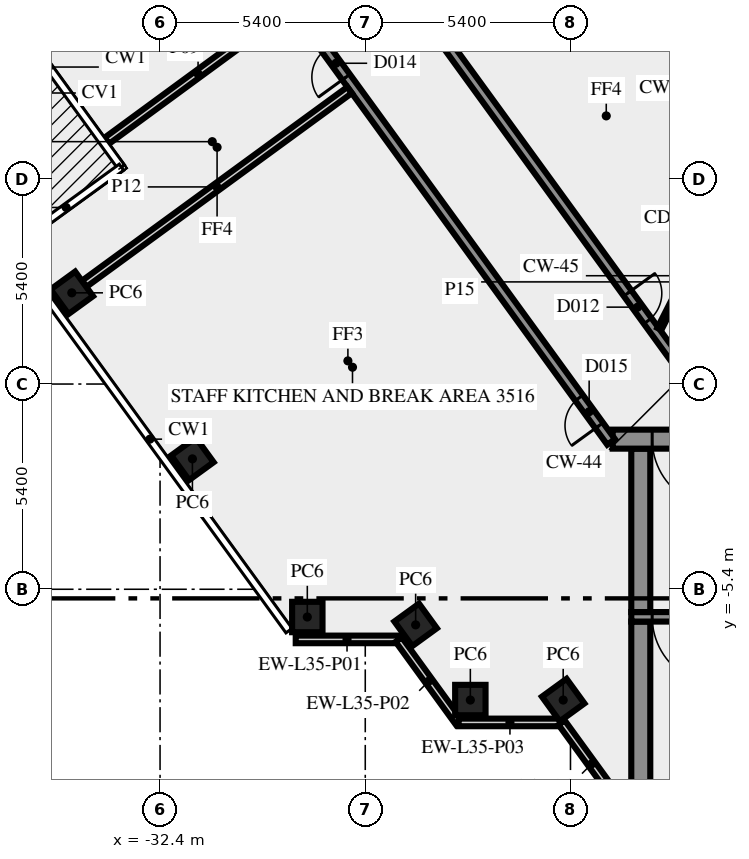
"""IFC4 building model, lengths in metres.
Left out: names, types, materials, properties, quantities, classifications, styles, units other than length and angle.
Written with IfcOpenShell. Run it as: python <this file> out.ifc"""

import sys

from ifc_helpers import new_model, si_unit, direction, frame, frame_2d, origin, origin_2d, place, context, subcontext, project, spatial, rectangle, extrude, element, fill, save


model = new_model("IFC4")
c1 = context("Model", 3, precision=1e-05, world=origin(), true_north=direction((0.0, 1.0)))
c2 = subcontext(c1, "Body", "Model", "MODEL_VIEW")
j1 = project(units=[si_unit("LENGTHUNIT", "METRE"), si_unit("PLANEANGLEUNIT", "RADIAN")], contexts=[c1])
p1 = place(None, origin())
s1 = spatial("IfcSite", under=j1, at=p1, CompositionType="ELEMENT")
p2 = place(p1, origin())
s2 = spatial("IfcBuilding", under=s1, at=p2, CompositionType="ELEMENT")
p3 = place(p2, frame((0.0, 0.0, 152.0)))
s3 = spatial("IfcBuildingStorey", under=s2, at=p3, CompositionType="ELEMENT", Elevation=152.0)
for number, where, z_axis, x_axis in (
    (1, (-34.722, 2.4, 0.0), (0.0, 0.0, 1.0), (0.588, -0.809, 0.0)),
    (2, (-31.548, -1.969, 0.0), (0.0, 0.0, 1.0), (0.588, -0.809, 0.0)),
    (3, (-28.525, -6.13, 0.0), (0.0, 0.0, 1.0), (1.0, 0.0, 0.0)),
    (4, (-25.674, -6.337, 0.0), (0.0, 0.0, 1.0), (0.588, -0.809, 0.0)),
    (5, (-24.235, -8.315, 0.0), (0.0, 0.0, 1.0), (1.0, 0.0, 0.0)),
    (6, (-21.792, -8.315, 0.0), (0.0, 0.0, 1.0), (0.588, -0.809, 0.0)),
):
    element("IfcColumn", number, at=place(p3, frame(where, z_axis=z_axis, x_axis=x_axis)), inside=s3, PredefinedType="COLUMN", context=c2, shape_type="SweptSolid", body=[
        extrude(rectangle(XDim=0.8, YDim=0.8, at=origin_2d()), origin(), (0.0, 0.0, 1.0), 3.65),
    ])
p4 = place(p3, frame((-28.83, -6.719, 0.0), z_axis=(0.0, 0.0, 1.0), x_axis=(1.0, 0.0, 0.0)))
e7 = element("IfcWall", 7, at=p4, inside=s3, PredefinedType="SOLIDWALL", context=c2, shape_type="SweptSolid", body=[
    extrude(rectangle(XDim=2.7, YDim=0.2, at=frame_2d((1.35, 0.0))), origin(), (0.0, 0.0, 1.0), 3.65),
])
p5 = place(p3, frame((-26.12, -6.724, 0.0), z_axis=(0.0, 0.0, 1.0), x_axis=(0.587720002413, -0.809064397168, 0.0)))
e8 = element("IfcWall", 8, at=p5, inside=s3, PredefinedType="SOLIDWALL", context=c2, shape_type="SweptSolid", body=[
    extrude(rectangle(XDim=2.7, YDim=0.2, at=frame_2d((1.35, 0.0))), origin(), (0.0, 0.0, 1.0), 3.65),
])
p6 = place(p3, frame((-24.543, -8.904, 0.0), z_axis=(0.0, 0.0, 1.0), x_axis=(1.0, 0.0, 0.0)))
e9 = element("IfcWall", 9, at=p6, inside=s3, PredefinedType="SOLIDWALL", context=c2, shape_type="SweptSolid", body=[
    extrude(rectangle(XDim=2.7, YDim=0.2, at=frame_2d((1.35, 0.0))), origin(), (0.0, 0.0, 1.0), 3.65),
])
p7 = place(p3, frame((-21.833, -8.909, 0.0), z_axis=(0.0, 0.0, 1.0), x_axis=(0.587766567315, -0.809030569476, 0.0)))
e10 = element("IfcWall", 10, at=p7, inside=s3, PredefinedType="SOLIDWALL", context=c2, shape_type="SweptSolid", body=[
    extrude(rectangle(XDim=2.688, YDim=0.2, at=frame_2d((1.344, 0.0))), origin(), (0.0, 0.0, 1.0), 3.65),
])
p8 = place(p3, frame((-19.75, -10.5, 0.0), z_axis=(0.0, 0.0, 1.0), x_axis=(0.0, 1.0, 0.0)))
e11 = element("IfcWall", 11, at=p8, inside=s3, PredefinedType="SHEAR", context=c2, shape_type="SweptSolid", body=[
    extrude(rectangle(XDim=4.25, YDim=0.5, at=frame_2d((2.125, 0.0))), origin(), (0.0, 0.0, 1.0), 3.65),
])
p9 = place(p3, frame((-9.8, -6.125, 0.0), z_axis=(0.0, 0.0, 1.0), x_axis=(-1.0, 0.0, 0.0)))
e12 = element("IfcWall", 12, at=p9, inside=s3, PredefinedType="SHEAR", context=c2, shape_type="SweptSolid", body=[
    extrude(rectangle(XDim=10.2, YDim=0.25, at=frame_2d((5.1, 0.0))), origin(), (0.0, 0.0, 1.0), 3.65),
])
p10 = place(p9, frame((7.85, 0.0, 0.0)))
e13 = element("IfcOpeningElement", 13, at=p10, cuts=e12, PredefinedType="OPENING", context=c2, shape_type="SweptSolid", body=[
    extrude(rectangle(XDim=1.8, YDim=2.1, at=frame_2d((0.9, 1.05))), frame((0.0, 0.135, 0.0), z_axis=(0.0, -1.0, 0.0), x_axis=(1.0, 0.0, 0.0)), (0.0, 0.0, 1.0), 0.27),
])
p11 = place(p3, frame((-19.75, -6.0, 0.0), z_axis=(0.0, 0.0, 1.0), x_axis=(0.0, 1.0, 0.0)))
e14 = element("IfcWall", 14, at=p11, inside=s3, PredefinedType="SHEAR", context=c2, shape_type="SweptSolid", body=[
    extrude(rectangle(XDim=4.3, YDim=0.5, at=frame_2d((2.15, 0.0))), origin(), (0.0, 0.0, 1.0), 3.65),
])
p12 = place(p3, frame((20.49, -1.45, 0.0), z_axis=(0.0, 0.0, 1.0), x_axis=(-1.0, 0.0, 0.0)))
e15 = element("IfcWall", 15, at=p12, inside=s3, PredefinedType="SHEAR", context=c2, shape_type="SweptSolid", body=[
    extrude(rectangle(XDim=40.98, YDim=0.5, at=frame_2d((20.49, 0.0))), origin(), (0.0, 0.0, 1.0), 3.65),
])
p13 = place(p12, frame((38.14, 0.0, 0.0)))
e16 = element("IfcOpeningElement", 16, at=p13, cuts=e15, PredefinedType="OPENING", context=c2, shape_type="SweptSolid", body=[
    extrude(rectangle(XDim=1.8, YDim=2.1, at=frame_2d((0.9, 1.05))), frame((0.0, 0.26, 0.0), z_axis=(0.0, -1.0, 0.0), x_axis=(1.0, 0.0, 0.0)), (0.0, 0.0, 1.0), 0.52),
])
p14 = place(p12, frame((35.89, 0.0, 0.0)))
e17 = element("IfcOpeningElement", 17, at=p14, cuts=e15, PredefinedType="OPENING", context=c2, shape_type="SweptSolid", body=[
    extrude(rectangle(XDim=0.9, YDim=2.1, at=frame_2d((0.45, 1.05))), frame((0.0, 0.26, 0.0), z_axis=(0.0, -1.0, 0.0), x_axis=(1.0, 0.0, 0.0)), (0.0, 0.0, 1.0), 0.52),
])
p15 = place(p12, frame((32.94, 0.0, 0.0)))
e18 = element("IfcOpeningElement", 18, at=p15, cuts=e15, PredefinedType="OPENING", context=c2, shape_type="SweptSolid", body=[
    extrude(rectangle(XDim=0.9, YDim=2.1, at=frame_2d((0.45, 1.05))), frame((0.0, 0.26, 0.0), z_axis=(0.0, -1.0, 0.0), x_axis=(1.0, 0.0, 0.0)), (0.0, 0.0, 1.0), 0.52),
])
p16 = place(p12, frame((29.802, 0.0, 0.0)))
e19 = element("IfcOpeningElement", 19, at=p16, cuts=e15, PredefinedType="OPENING", context=c2, shape_type="SweptSolid", body=[
    extrude(rectangle(XDim=0.9, YDim=2.1, at=frame_2d((0.45, 1.05))), frame((0.0, 0.26, 0.0), z_axis=(0.0, -1.0, 0.0), x_axis=(1.0, 0.0, 0.0)), (0.0, 0.0, 1.0), 0.52),
])
p17 = place(p12, frame((26.077, 0.0, 0.0)))
e20 = element("IfcOpeningElement", 20, at=p17, cuts=e15, PredefinedType="OPENING", context=c2, shape_type="SweptSolid", body=[
    extrude(rectangle(XDim=0.9, YDim=2.1, at=frame_2d((0.45, 1.05))), frame((0.0, 0.26, 0.0), z_axis=(0.0, -1.0, 0.0), x_axis=(1.0, 0.0, 0.0)), (0.0, 0.0, 1.0), 0.52),
])
p18 = place(p12, frame((19.59, 0.0, 0.0)))
e21 = element("IfcOpeningElement", 21, at=p18, cuts=e15, PredefinedType="OPENING", context=c2, shape_type="SweptSolid", body=[
    extrude(rectangle(XDim=2.0, YDim=2.1, at=frame_2d((1.0, 1.05))), frame((0.0, 0.26, 0.0), z_axis=(0.0, -1.0, 0.0), x_axis=(1.0, 0.0, 0.0)), (0.0, 0.0, 1.0), 0.52),
])
p19 = place(p12, frame((7.14, 0.0, 0.0)))
e22 = element("IfcOpeningElement", 22, at=p19, cuts=e15, PredefinedType="OPENING", context=c2, shape_type="SweptSolid", body=[
    extrude(rectangle(XDim=0.9, YDim=2.1, at=frame_2d((0.45, 1.05))), frame((0.0, 0.26, 0.0), z_axis=(0.0, -1.0, 0.0), x_axis=(1.0, 0.0, 0.0)), (0.0, 0.0, 1.0), 0.52),
])
p20 = place(p12, frame((5.028, 0.0, 0.0)))
e23 = element("IfcOpeningElement", 23, at=p20, cuts=e15, PredefinedType="OPENING", context=c2, shape_type="SweptSolid", body=[
    extrude(rectangle(XDim=0.8, YDim=2.1, at=frame_2d((0.4, 1.05))), frame((0.0, 0.26, 0.0), z_axis=(0.0, -1.0, 0.0), x_axis=(1.0, 0.0, 0.0)), (0.0, 0.0, 1.0), 0.52),
])
p21 = place(p12, frame((3.452, 0.0, 0.0)))
e24 = element("IfcOpeningElement", 24, at=p21, cuts=e15, PredefinedType="OPENING", context=c2, shape_type="SweptSolid", body=[
    extrude(rectangle(XDim=0.8, YDim=2.1, at=frame_2d((0.4, 1.05))), frame((0.0, 0.26, 0.0), z_axis=(0.0, -1.0, 0.0), x_axis=(1.0, 0.0, 0.0)), (0.0, 0.0, 1.0), 0.52),
])
p22 = place(p12, frame((1.04, 0.0, 0.0)))
e25 = element("IfcOpeningElement", 25, at=p22, cuts=e15, PredefinedType="OPENING", context=c2, shape_type="SweptSolid", body=[
    extrude(rectangle(XDim=1.8, YDim=2.1, at=frame_2d((0.9, 1.05))), frame((0.0, 0.26, 0.0), z_axis=(0.0, -1.0, 0.0), x_axis=(1.0, 0.0, 0.0)), (0.0, 0.0, 1.0), 0.52),
])
p23 = place(p3, frame((-20.531, -1.523, 0.0), z_axis=(0.0, 0.0, 1.0), x_axis=(-0.587785812891, 0.809016587076, 0.0)))
e26 = element("IfcWall", 26, at=p23, inside=s3, PredefinedType="SOLIDWALL", context=c2, shape_type="SweptSolid", body=[
    extrude(rectangle(XDim=28.67, YDim=0.25, at=frame_2d((14.335, 0.0))), origin(), (0.0, 0.0, 1.0), 3.65),
])
p24 = place(p23, frame((27.296, 0.0, 0.0)))
e27 = element("IfcOpeningElement", 27, at=p24, cuts=e26, PredefinedType="OPENING", context=c2, shape_type="SweptSolid", body=[
    extrude(rectangle(XDim=0.9, YDim=2.1, at=frame_2d((0.45, 1.05))), frame((0.0, 0.135, 0.0), z_axis=(0.0, -1.0, 0.0), x_axis=(1.0, 0.0, 0.0)), (0.0, 0.0, 1.0), 0.27),
])
p25 = place(p23, frame((11.866, 0.0, 0.0)))
e28 = element("IfcOpeningElement", 28, at=p25, cuts=e26, PredefinedType="OPENING", context=c2, shape_type="SweptSolid", body=[
    extrude(rectangle(XDim=0.9, YDim=2.1, at=frame_2d((0.45, 1.05))), frame((0.0, 0.135, 0.0), z_axis=(0.0, -1.0, 0.0), x_axis=(1.0, 0.0, 0.0)), (0.0, 0.0, 1.0), 0.27),
])
p26 = place(p23, frame((0.533, 0.0, 0.0)))
e29 = element("IfcOpeningElement", 29, at=p26, cuts=e26, PredefinedType="OPENING", context=c2, shape_type="SweptSolid", body=[
    extrude(rectangle(XDim=0.9, YDim=2.1, at=frame_2d((0.45, 1.05))), frame((0.0, 0.135, 0.0), z_axis=(0.0, -1.0, 0.0), x_axis=(1.0, 0.0, 0.0)), (0.0, 0.0, 1.0), 0.27),
])
p27 = place(p3, frame((-35.092, 23.027, 0.0), z_axis=(0.0, 0.0, 1.0), x_axis=(0.587784076945, -0.809017848313, 0.0)))
e30 = element("IfcWall", 30, at=p27, inside=s3, PredefinedType="SOLIDWALL", context=c2, shape_type="SweptSolid", body=[
    extrude(rectangle(XDim=29.853, YDim=0.25, at=frame_2d((14.927, 0.0))), origin(), (0.0, 0.0, 1.0), 3.65),
])
p28 = place(p27, frame((0.224, 0.0, 0.0)))
e31 = element("IfcOpeningElement", 31, at=p28, cuts=e30, PredefinedType="OPENING", context=c2, shape_type="SweptSolid", body=[
    extrude(rectangle(XDim=0.9, YDim=2.1, at=frame_2d((0.45, 1.05))), frame((0.0, 0.135, 0.0), z_axis=(0.0, -1.0, 0.0), x_axis=(1.0, 0.0, 0.0)), (0.0, 0.0, 1.0), 0.27),
])
p29 = place(p27, frame((25.512, 0.0, 0.0)))
e32 = element("IfcOpeningElement", 32, at=p29, cuts=e30, PredefinedType="OPENING", context=c2, shape_type="SweptSolid", body=[
    extrude(rectangle(XDim=0.9, YDim=2.1, at=frame_2d((0.45, 1.05))), frame((0.0, 0.135, 0.0), z_axis=(0.0, -1.0, 0.0), x_axis=(1.0, 0.0, 0.0)), (0.0, 0.0, 1.0), 0.27),
])
p30 = place(p3, frame((-33.799, 6.403, 0.0), z_axis=(0.0, 0.0, 1.0), x_axis=(0.806598014579, 0.591100366163, 0.0)))
e33 = element("IfcWall", 33, at=p30, inside=s3, PredefinedType="SOLIDWALL", context=c2, shape_type="SweptSolid", body=[
    extrude(rectangle(XDim=5.95, YDim=0.2, at=frame_2d((2.975, 0.0))), origin(), (0.0, 0.0, 1.0), 3.65),
])
p31 = place(p3, frame((-34.395, 2.638, 0.0), z_axis=(0.0, 0.0, 1.0), x_axis=(0.807657534767, 0.589651851973, 0.0)))
e34 = element("IfcWall", 34, at=p31, inside=s3, PredefinedType="SOLIDWALL", context=c2, shape_type="SweptSolid", body=[
    extrude(rectangle(XDim=8.644, YDim=0.2, at=frame_2d((4.322, 0.0))), origin(), (0.0, 0.0, 1.0), 3.65),
])
p32 = place(p3, frame((-19.261, 1.45, 0.0), z_axis=(0.0, 0.0, 1.0), x_axis=(0.453950796792, 0.891026752736, 0.0)))
e35 = element("IfcWall", 35, at=p32, inside=s3, PredefinedType="PARTITIONING", context=c2, shape_type="SweptSolid", body=[
    extrude(rectangle(XDim=2.778, YDim=0.12, at=frame_2d((1.389, 0.0))), origin(), (0.0, 0.0, 1.0), 3.65),
])
p33 = place(p10, origin())
e36 = element("IfcDoor", 36, at=p33, inside=s3, OperationType="DOUBLE_DOOR_SINGLE_SWING", PredefinedType="DOOR", context=c2, shape_type="SweptSolid", body=[
    extrude(rectangle(XDim=1.8, YDim=2.1, at=frame_2d((0.9, 1.05))), frame((0.0, 0.025, 0.0), z_axis=(0.0, -1.0, 0.0), x_axis=(1.0, 0.0, 0.0)), (0.0, 0.0, 1.0), 0.05),
])
fill(e13, e36)
p34 = place(p13, origin())
e37 = element("IfcDoor", 37, at=p34, inside=s3, OperationType="DOUBLE_DOOR_SINGLE_SWING", PredefinedType="DOOR", context=c2, shape_type="SweptSolid", body=[
    extrude(rectangle(XDim=1.8, YDim=2.1, at=frame_2d((0.9, 1.05))), frame((0.0, 0.025, 0.0), z_axis=(0.0, -1.0, 0.0), x_axis=(1.0, 0.0, 0.0)), (0.0, 0.0, 1.0), 0.05),
])
fill(e16, e37)
p35 = place(p29, origin())
e38 = element("IfcDoor", 38, at=p35, inside=s3, OperationType="SINGLE_SWING_RIGHT", PredefinedType="DOOR", context=c2, shape_type="SweptSolid", body=[
    extrude(rectangle(XDim=0.9, YDim=2.1, at=frame_2d((0.45, 1.05))), frame((0.0, 0.025, 0.0), z_axis=(0.0, -1.0, 0.0), x_axis=(1.0, 0.0, 0.0)), (0.0, 0.0, 1.0), 0.05),
])
fill(e32, e38)
p36 = place(p25, origin())
e39 = element("IfcDoor", 39, at=p36, inside=s3, OperationType="SINGLE_SWING_LEFT", PredefinedType="DOOR", context=c2, shape_type="SweptSolid", body=[
    extrude(rectangle(XDim=0.9, YDim=2.1, at=frame_2d((0.45, 1.05))), frame((0.0, 0.025, 0.0), z_axis=(0.0, -1.0, 0.0), x_axis=(1.0, 0.0, 0.0)), (0.0, 0.0, 1.0), 0.05),
])
fill(e28, e39)
p37 = place(p26, origin())
e40 = element("IfcDoor", 40, at=p37, inside=s3, OperationType="SINGLE_SWING_LEFT", PredefinedType="DOOR", context=c2, shape_type="SweptSolid", body=[
    extrude(rectangle(XDim=0.9, YDim=2.1, at=frame_2d((0.45, 1.05))), frame((0.0, 0.025, 0.0), z_axis=(0.0, -1.0, 0.0), x_axis=(1.0, 0.0, 0.0)), (0.0, 0.0, 1.0), 0.05),
])
fill(e29, e40)
save(model, sys.argv[1])
